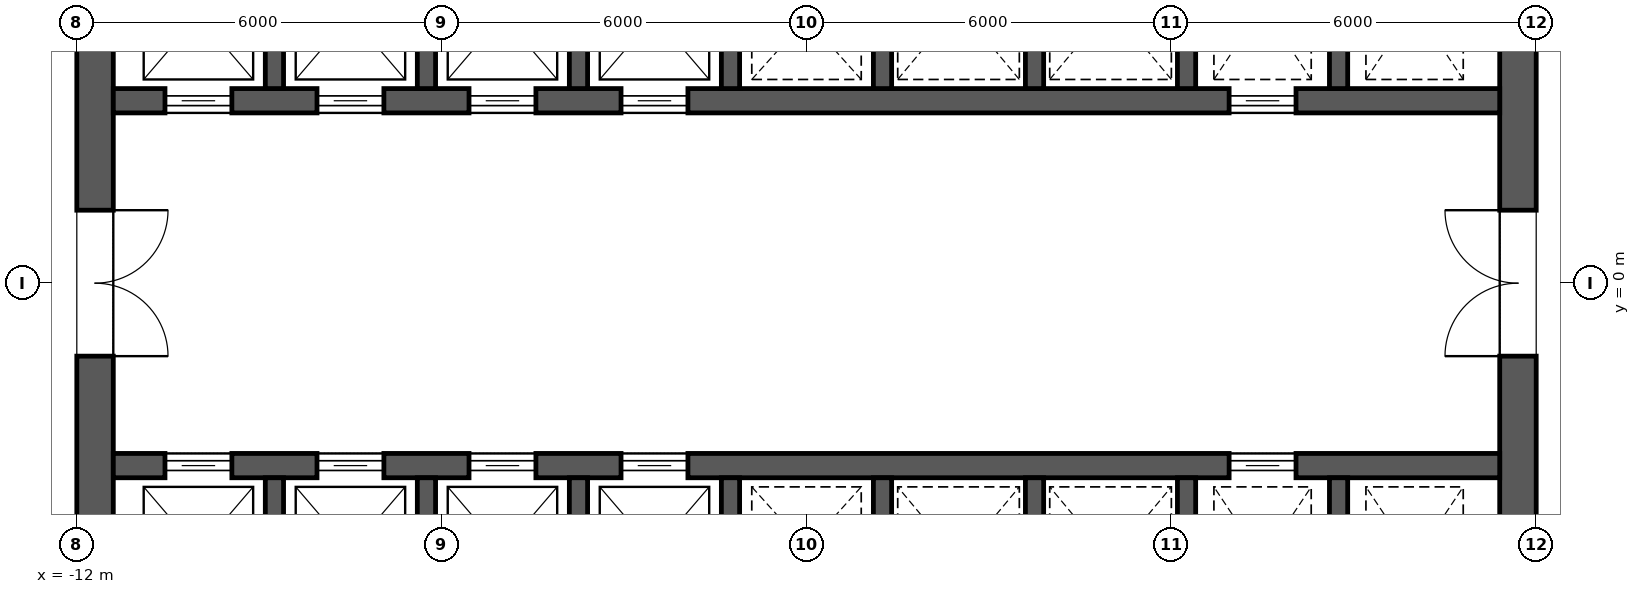
"""IFC4 building model, lengths in metres.
Left out: names, types, materials, properties, quantities, classifications, styles, units other than length and angle.
Written with IfcOpenShell. Run it as: python <this file> out.ifc"""

import sys

from ifc_helpers import new_model, si_unit, direction, frame, frame_2d, origin, place, context, subcontext, project, spatial, rectangle, extrude, element, fill, save


model = new_model("IFC4")
c1 = context("Model", 3, precision=1e-05, world=origin(), true_north=direction((0.0, 1.0)))
c2 = subcontext(c1, "Body", "Model", "MODEL_VIEW")
j1 = project(units=[si_unit("LENGTHUNIT", "METRE"), si_unit("PLANEANGLEUNIT", "RADIAN")], contexts=[c1])
p1 = place(None, origin())
s1 = spatial("IfcSite", under=j1, at=p1, CompositionType="ELEMENT")
p2 = place(p1, origin())
s2 = spatial("IfcBuilding", under=s1, at=p2, CompositionType="ELEMENT")
p3 = place(p2, frame((0.0, 0.0, 154.9)))
s3 = spatial("IfcBuildingStorey", under=s2, at=p3, CompositionType="ELEMENT", Elevation=154.9)
p4 = place(p3, frame((11.7, -11.4, 0.0), z_axis=(0.0, 0.0, 1.0), x_axis=(0.0, 1.0, 0.0)))
e1 = element("IfcWall", 1, at=p4, inside=s3, PredefinedType="SHEAR", context=c2, shape_type="SweptSolid", body=[
    extrude(rectangle(XDim=22.8, YDim=0.6, at=frame_2d((11.4, 0.0))), origin(), (0.0, 0.0, 1.0), 4.2),
])
p5 = place(p4, frame((10.2, 0.0, 0.0)))
e2 = element("IfcOpeningElement", 2, at=p5, cuts=e1, PredefinedType="OPENING", context=c2, shape_type="SweptSolid", body=[
    extrude(rectangle(XDim=2.4, YDim=2.1, at=frame_2d((1.2, 1.05))), frame((0.0, 0.312, 0.0), z_axis=(0.0, -1.0, 0.0), x_axis=(1.0, 0.0, 0.0)), (0.0, 0.0, 1.0), 0.624),
])
p6 = place(p4, frame((19.5, 0.0, 0.0)))
e3 = element("IfcOpeningElement", 3, at=p6, cuts=e1, PredefinedType="OPENING", context=c2, shape_type="SweptSolid", body=[
    extrude(rectangle(XDim=1.2, YDim=2.1, at=frame_2d((0.6, 1.05))), frame((0.0, 0.312, 0.0), z_axis=(0.0, -1.0, 0.0), x_axis=(1.0, 0.0, 0.0)), (0.0, 0.0, 1.0), 0.624),
])
p7 = place(p4, frame((2.1, 0.0, 0.0)))
e4 = element("IfcOpeningElement", 4, at=p7, cuts=e1, PredefinedType="OPENING", context=c2, shape_type="SweptSolid", body=[
    extrude(rectangle(XDim=1.2, YDim=2.1, at=frame_2d((0.6, 1.05))), frame((0.0, 0.312, 0.0), z_axis=(0.0, -1.0, 0.0), x_axis=(1.0, 0.0, 0.0)), (0.0, 0.0, 1.0), 0.624),
])
p8 = place(p3, frame((-11.7, -11.4, 0.0), z_axis=(0.0, 0.0, 1.0), x_axis=(0.0, 1.0, 0.0)))
e5 = element("IfcWall", 5, at=p8, inside=s3, PredefinedType="SHEAR", context=c2, shape_type="SweptSolid", body=[
    extrude(rectangle(XDim=22.8, YDim=0.6, at=frame_2d((11.4, 0.0))), origin(), (0.0, 0.0, 1.0), 4.2),
])
p9 = place(p8, frame((10.2, 0.0, 0.0)))
e6 = element("IfcOpeningElement", 6, at=p9, cuts=e5, PredefinedType="OPENING", context=c2, shape_type="SweptSolid", body=[
    extrude(rectangle(XDim=2.4, YDim=2.1, at=frame_2d((1.2, 1.05))), frame((0.0, 0.312, 0.0), z_axis=(0.0, -1.0, 0.0), x_axis=(1.0, 0.0, 0.0)), (0.0, 0.0, 1.0), 0.624),
])
p10 = place(p8, frame((18.925, 0.0, 0.0)))
e7 = element("IfcOpeningElement", 7, at=p10, cuts=e5, PredefinedType="OPENING", context=c2, shape_type="SweptSolid", body=[
    extrude(rectangle(XDim=1.2, YDim=2.1, at=frame_2d((0.6, 1.05))), frame((0.0, 0.312, 0.0), z_axis=(0.0, -1.0, 0.0), x_axis=(1.0, 0.0, 0.0)), (0.0, 0.0, 1.0), 0.624),
])
p11 = place(p8, frame((2.675, 0.0, 0.0)))
e8 = element("IfcOpeningElement", 8, at=p11, cuts=e5, PredefinedType="OPENING", context=c2, shape_type="SweptSolid", body=[
    extrude(rectangle(XDim=1.2, YDim=2.1, at=frame_2d((0.6, 1.05))), frame((0.0, 0.312, 0.0), z_axis=(0.0, -1.0, 0.0), x_axis=(1.0, 0.0, 0.0)), (0.0, 0.0, 1.0), 0.624),
])
p12 = place(p3, frame((-11.4, 3.0, 0.0), z_axis=(0.0, 0.0, 1.0), x_axis=(1.0, 0.0, 0.0)))
e9 = element("IfcWall", 9, at=p12, inside=s3, PredefinedType="SHEAR", context=c2, shape_type="SweptSolid", body=[
    extrude(rectangle(XDim=22.8, YDim=0.4, at=frame_2d((11.4, 0.0))), origin(), (0.0, 0.0, 1.0), 4.2),
])
p13 = place(p12, frame((0.85, 0.0, 0.0)))
e10 = element("IfcOpeningElement", 10, at=p13, cuts=e9, PredefinedType="OPENING", context=c2, shape_type="SweptSolid", body=[
    extrude(rectangle(XDim=1.1, YDim=2.1, at=frame_2d((0.55, 1.05))), frame((0.0, 0.212, 0.0), z_axis=(0.0, -1.0, 0.0), x_axis=(1.0, 0.0, 0.0)), (0.0, 0.0, 1.0), 0.424),
])
p14 = place(p12, frame((3.35, 0.0, 0.0)))
e11 = element("IfcOpeningElement", 11, at=p14, cuts=e9, PredefinedType="OPENING", context=c2, shape_type="SweptSolid", body=[
    extrude(rectangle(XDim=1.1, YDim=2.1, at=frame_2d((0.55, 1.05))), frame((0.0, 0.212, 0.0), z_axis=(0.0, -1.0, 0.0), x_axis=(1.0, 0.0, 0.0)), (0.0, 0.0, 1.0), 0.424),
])
p15 = place(p12, frame((5.85, 0.0, 0.0)))
e12 = element("IfcOpeningElement", 12, at=p15, cuts=e9, PredefinedType="OPENING", context=c2, shape_type="SweptSolid", body=[
    extrude(rectangle(XDim=1.1, YDim=2.1, at=frame_2d((0.55, 1.05))), frame((0.0, 0.212, 0.0), z_axis=(0.0, -1.0, 0.0), x_axis=(1.0, 0.0, 0.0)), (0.0, 0.0, 1.0), 0.424),
])
p16 = place(p12, frame((8.35, 0.0, 0.0)))
e13 = element("IfcOpeningElement", 13, at=p16, cuts=e9, PredefinedType="OPENING", context=c2, shape_type="SweptSolid", body=[
    extrude(rectangle(XDim=1.1, YDim=2.1, at=frame_2d((0.55, 1.05))), frame((0.0, 0.212, 0.0), z_axis=(0.0, -1.0, 0.0), x_axis=(1.0, 0.0, 0.0)), (0.0, 0.0, 1.0), 0.424),
])
p17 = place(p12, frame((18.35, 0.0, 0.0)))
e14 = element("IfcOpeningElement", 14, at=p17, cuts=e9, PredefinedType="OPENING", context=c2, shape_type="SweptSolid", body=[
    extrude(rectangle(XDim=1.1, YDim=2.1, at=frame_2d((0.55, 1.05))), frame((0.0, 0.212, 0.0), z_axis=(0.0, -1.0, 0.0), x_axis=(1.0, 0.0, 0.0)), (0.0, 0.0, 1.0), 0.424),
])
for number, where, z_axis, x_axis in (
    (15, (-8.75, 3.2, 0.0), (0.0, 0.0, 1.0), (0.0, 1.0, 0.0)),
    (16, (-6.25, 3.2, 0.0), (0.0, 0.0, 1.0), (0.0, 1.0, 0.0)),
    (17, (-3.75, 3.2, 0.0), (0.0, 0.0, 1.0), (0.0, 1.0, 0.0)),
    (18, (-1.25, 3.2, 0.0), (0.0, 0.0, 1.0), (0.0, 1.0, 0.0)),
    (19, (1.25, 3.2, 0.0), (0.0, 0.0, 1.0), (0.0, 1.0, 0.0)),
    (20, (3.75, 3.2, 0.0), (0.0, 0.0, 1.0), (0.0, 1.0, 0.0)),
    (21, (6.25, 3.2, 0.0), (0.0, 0.0, 1.0), (0.0, 1.0, 0.0)),
    (22, (8.75, 3.2, 0.0), (0.0, 0.0, 1.0), (0.0, 1.0, 0.0)),
):
    element("IfcWall", number, at=place(p3, frame(where, z_axis=z_axis, x_axis=x_axis)), inside=s3, PredefinedType="SHEAR", context=c2, shape_type="SweptSolid", body=[
        extrude(rectangle(XDim=2.9, YDim=0.3, at=frame_2d((1.45, 0.0))), origin(), (0.0, 0.0, 1.0), 4.2),
    ])
p18 = place(p3, frame((-11.4, -3.0, 0.0), z_axis=(0.0, 0.0, 1.0), x_axis=(1.0, 0.0, 0.0)))
e23 = element("IfcWall", 23, at=p18, inside=s3, PredefinedType="SHEAR", context=c2, shape_type="SweptSolid", body=[
    extrude(rectangle(XDim=22.8, YDim=0.4, at=frame_2d((11.4, 0.0))), origin(), (0.0, 0.0, 1.0), 4.2),
])
p19 = place(p18, frame((0.85, 0.0, 0.0)))
e24 = element("IfcOpeningElement", 24, at=p19, cuts=e23, PredefinedType="OPENING", context=c2, shape_type="SweptSolid", body=[
    extrude(rectangle(XDim=1.1, YDim=2.1, at=frame_2d((0.55, 1.05))), frame((0.0, 0.212, 0.0), z_axis=(0.0, -1.0, 0.0), x_axis=(1.0, 0.0, 0.0)), (0.0, 0.0, 1.0), 0.424),
])
p20 = place(p18, frame((3.35, 0.0, 0.0)))
e25 = element("IfcOpeningElement", 25, at=p20, cuts=e23, PredefinedType="OPENING", context=c2, shape_type="SweptSolid", body=[
    extrude(rectangle(XDim=1.1, YDim=2.1, at=frame_2d((0.55, 1.05))), frame((0.0, 0.212, 0.0), z_axis=(0.0, -1.0, 0.0), x_axis=(1.0, 0.0, 0.0)), (0.0, 0.0, 1.0), 0.424),
])
p21 = place(p18, frame((5.85, 0.0, 0.0)))
e26 = element("IfcOpeningElement", 26, at=p21, cuts=e23, PredefinedType="OPENING", context=c2, shape_type="SweptSolid", body=[
    extrude(rectangle(XDim=1.1, YDim=2.1, at=frame_2d((0.55, 1.05))), frame((0.0, 0.212, 0.0), z_axis=(0.0, -1.0, 0.0), x_axis=(1.0, 0.0, 0.0)), (0.0, 0.0, 1.0), 0.424),
])
p22 = place(p18, frame((8.35, 0.0, 0.0)))
e27 = element("IfcOpeningElement", 27, at=p22, cuts=e23, PredefinedType="OPENING", context=c2, shape_type="SweptSolid", body=[
    extrude(rectangle(XDim=1.1, YDim=2.1, at=frame_2d((0.55, 1.05))), frame((0.0, 0.212, 0.0), z_axis=(0.0, -1.0, 0.0), x_axis=(1.0, 0.0, 0.0)), (0.0, 0.0, 1.0), 0.424),
])
p23 = place(p18, frame((18.35, 0.0, 0.0)))
e28 = element("IfcOpeningElement", 28, at=p23, cuts=e23, PredefinedType="OPENING", context=c2, shape_type="SweptSolid", body=[
    extrude(rectangle(XDim=1.1, YDim=2.1, at=frame_2d((0.55, 1.05))), frame((0.0, 0.212, 0.0), z_axis=(0.0, -1.0, 0.0), x_axis=(1.0, 0.0, 0.0)), (0.0, 0.0, 1.0), 0.424),
])
for number, where, z_axis, x_axis in (
    (29, (-8.75, -6.1, 0.0), (0.0, 0.0, 1.0), (0.0, 1.0, 0.0)),
    (30, (-6.25, -6.1, 0.0), (0.0, 0.0, 1.0), (0.0, 1.0, 0.0)),
    (31, (-3.75, -6.1, 0.0), (0.0, 0.0, 1.0), (0.0, 1.0, 0.0)),
    (32, (-1.25, -6.1, 0.0), (0.0, 0.0, 1.0), (0.0, 1.0, 0.0)),
    (33, (1.25, -6.1, 0.0), (0.0, 0.0, 1.0), (0.0, 1.0, 0.0)),
    (34, (3.75, -6.1, 0.0), (0.0, 0.0, 1.0), (0.0, 1.0, 0.0)),
    (35, (6.25, -6.1, 0.0), (0.0, 0.0, 1.0), (0.0, 1.0, 0.0)),
    (36, (8.75, -6.1, 0.0), (0.0, 0.0, 1.0), (0.0, 1.0, 0.0)),
):
    element("IfcWall", number, at=place(p3, frame(where, z_axis=z_axis, x_axis=x_axis)), inside=s3, PredefinedType="SHEAR", context=c2, shape_type="SweptSolid", body=[
        extrude(rectangle(XDim=2.9, YDim=0.3, at=frame_2d((1.45, 0.0))), origin(), (0.0, 0.0, 1.0), 4.2),
    ])
p24 = place(p13, origin())
e37 = element("IfcDoor", 37, at=p24, inside=s3, OperationType="SLIDING_TO_LEFT", PredefinedType="DOOR", context=c2, shape_type="SweptSolid", body=[
    extrude(rectangle(XDim=1.1, YDim=2.1, at=frame_2d((0.55, 1.05))), frame((0.0, 0.025, 0.0), z_axis=(0.0, -1.0, 0.0), x_axis=(1.0, 0.0, 0.0)), (0.0, 0.0, 1.0), 0.05),
])
fill(e10, e37)
p25 = place(p14, origin())
e38 = element("IfcDoor", 38, at=p25, inside=s3, OperationType="SLIDING_TO_LEFT", PredefinedType="DOOR", context=c2, shape_type="SweptSolid", body=[
    extrude(rectangle(XDim=1.1, YDim=2.1, at=frame_2d((0.55, 1.05))), frame((0.0, 0.025, 0.0), z_axis=(0.0, -1.0, 0.0), x_axis=(1.0, 0.0, 0.0)), (0.0, 0.0, 1.0), 0.05),
])
fill(e11, e38)
p26 = place(p15, origin())
e39 = element("IfcDoor", 39, at=p26, inside=s3, OperationType="SLIDING_TO_LEFT", PredefinedType="DOOR", context=c2, shape_type="SweptSolid", body=[
    extrude(rectangle(XDim=1.1, YDim=2.1, at=frame_2d((0.55, 1.05))), frame((0.0, 0.025, 0.0), z_axis=(0.0, -1.0, 0.0), x_axis=(1.0, 0.0, 0.0)), (0.0, 0.0, 1.0), 0.05),
])
fill(e12, e39)
p27 = place(p16, origin())
e40 = element("IfcDoor", 40, at=p27, inside=s3, OperationType="SLIDING_TO_LEFT", PredefinedType="DOOR", context=c2, shape_type="SweptSolid", body=[
    extrude(rectangle(XDim=1.1, YDim=2.1, at=frame_2d((0.55, 1.05))), frame((0.0, 0.025, 0.0), z_axis=(0.0, -1.0, 0.0), x_axis=(1.0, 0.0, 0.0)), (0.0, 0.0, 1.0), 0.05),
])
fill(e13, e40)
p28 = place(p19, origin())
e41 = element("IfcDoor", 41, at=p28, inside=s3, OperationType="SLIDING_TO_LEFT", PredefinedType="DOOR", context=c2, shape_type="SweptSolid", body=[
    extrude(rectangle(XDim=1.1, YDim=2.1, at=frame_2d((0.55, 1.05))), frame((0.0, 0.025, 0.0), z_axis=(0.0, -1.0, 0.0), x_axis=(1.0, 0.0, 0.0)), (0.0, 0.0, 1.0), 0.05),
])
fill(e24, e41)
p29 = place(p20, origin())
e42 = element("IfcDoor", 42, at=p29, inside=s3, OperationType="SLIDING_TO_LEFT", PredefinedType="DOOR", context=c2, shape_type="SweptSolid", body=[
    extrude(rectangle(XDim=1.1, YDim=2.1, at=frame_2d((0.55, 1.05))), frame((0.0, 0.025, 0.0), z_axis=(0.0, -1.0, 0.0), x_axis=(1.0, 0.0, 0.0)), (0.0, 0.0, 1.0), 0.05),
])
fill(e25, e42)
p30 = place(p21, origin())
e43 = element("IfcDoor", 43, at=p30, inside=s3, OperationType="SLIDING_TO_LEFT", PredefinedType="DOOR", context=c2, shape_type="SweptSolid", body=[
    extrude(rectangle(XDim=1.1, YDim=2.1, at=frame_2d((0.55, 1.05))), frame((0.0, 0.025, 0.0), z_axis=(0.0, -1.0, 0.0), x_axis=(1.0, 0.0, 0.0)), (0.0, 0.0, 1.0), 0.05),
])
fill(e26, e43)
p31 = place(p22, origin())
e44 = element("IfcDoor", 44, at=p31, inside=s3, OperationType="SLIDING_TO_LEFT", PredefinedType="DOOR", context=c2, shape_type="SweptSolid", body=[
    extrude(rectangle(XDim=1.1, YDim=2.1, at=frame_2d((0.55, 1.05))), frame((0.0, 0.025, 0.0), z_axis=(0.0, -1.0, 0.0), x_axis=(1.0, 0.0, 0.0)), (0.0, 0.0, 1.0), 0.05),
])
fill(e27, e44)
p32 = place(p17, origin())
e45 = element("IfcDoor", 45, at=p32, inside=s3, OperationType="SLIDING_TO_LEFT", PredefinedType="DOOR", context=c2, shape_type="SweptSolid", body=[
    extrude(rectangle(XDim=1.1, YDim=2.1, at=frame_2d((0.55, 1.05))), frame((0.0, 0.025, 0.0), z_axis=(0.0, -1.0, 0.0), x_axis=(1.0, 0.0, 0.0)), (0.0, 0.0, 1.0), 0.05),
])
fill(e14, e45)
p33 = place(p23, origin())
e46 = element("IfcDoor", 46, at=p33, inside=s3, OperationType="SLIDING_TO_LEFT", PredefinedType="DOOR", context=c2, shape_type="SweptSolid", body=[
    extrude(rectangle(XDim=1.1, YDim=2.1, at=frame_2d((0.55, 1.05))), frame((0.0, 0.025, 0.0), z_axis=(0.0, -1.0, 0.0), x_axis=(1.0, 0.0, 0.0)), (0.0, 0.0, 1.0), 0.05),
])
fill(e28, e46)
p34 = place(p9, frame((2.4, 0.0, 0.0), z_axis=(0.0, 0.0, 1.0), x_axis=(-1.0, 0.0, 0.0)))
e47 = element("IfcDoor", 47, at=p34, inside=s3, OperationType="DOUBLE_DOOR_SINGLE_SWING", PredefinedType="DOOR", context=c2, shape_type="SweptSolid", body=[
    extrude(rectangle(XDim=2.4, YDim=2.1, at=frame_2d((1.2, 1.05))), frame((0.0, 0.025, 0.0), z_axis=(0.0, -1.0, 0.0), x_axis=(1.0, 0.0, 0.0)), (0.0, 0.0, 1.0), 0.05),
])
fill(e6, e47)
p35 = place(p5, origin())
e48 = element("IfcDoor", 48, at=p35, inside=s3, OperationType="DOUBLE_DOOR_SINGLE_SWING", PredefinedType="DOOR", context=c2, shape_type="SweptSolid", body=[
    extrude(rectangle(XDim=2.4, YDim=2.1, at=frame_2d((1.2, 1.05))), frame((0.0, 0.025, 0.0), z_axis=(0.0, -1.0, 0.0), x_axis=(1.0, 0.0, 0.0)), (0.0, 0.0, 1.0), 0.05),
])
fill(e2, e48)
save(model, sys.argv[1])
